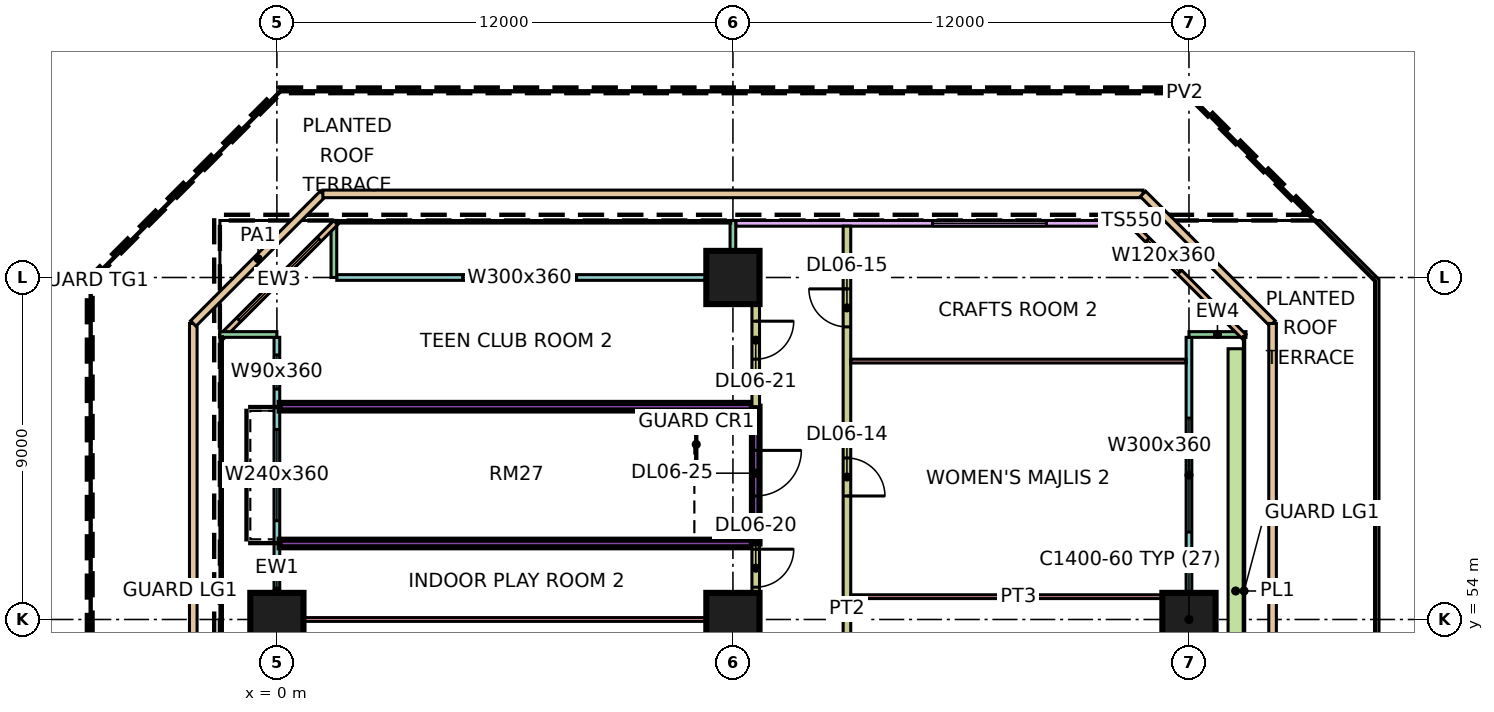
"""IFC4 building model, lengths in metres.
Left out: names, types, materials, properties, quantities, classifications, styles, units other than length and angle.
Written with IfcOpenShell. Run it as: python <this file> out.ifc"""

import sys

from ifc_helpers import new_model, si_unit, direction, frame, frame_2d, origin, origin_2d, place, context, subcontext, project, spatial, rectangle, extrude, element, fill, save


model = new_model("IFC4")
c1 = context("Model", 3, precision=1e-05, world=origin(), true_north=direction((0.0, 1.0)))
c2 = subcontext(c1, "Body", "Model", "MODEL_VIEW")
j1 = project(units=[si_unit("LENGTHUNIT", "METRE"), si_unit("PLANEANGLEUNIT", "RADIAN")], contexts=[c1])
p1 = place(None, origin())
s1 = spatial("IfcSite", under=j1, at=p1, CompositionType="ELEMENT")
p2 = place(p1, origin())
s2 = spatial("IfcBuilding", under=s1, at=p2, CompositionType="ELEMENT")
p3 = place(p2, frame((0.0, 0.0, 35.4)))
s3 = spatial("IfcBuildingStorey", under=s2, at=p3, CompositionType="ELEMENT", Elevation=35.4)
for number, where, z_axis, x_axis in (
    (1, (0.0, 54.0, 0.0), (0.0, 0.0, 1.0), (1.0, 0.0, 0.0)),
    (2, (12.0, 54.0, 0.0), (0.0, 0.0, 1.0), (1.0, 0.0, 0.0)),
):
    element("IfcColumn", number, at=place(p3, frame(where, z_axis=z_axis, x_axis=x_axis)), inside=s3, PredefinedType="COLUMN", context=c2, shape_type="SweptSolid", body=[
        extrude(rectangle(XDim=1.4, YDim=1.4, at=origin_2d()), origin(), (0.0, 0.0, 1.0), 6.0),
    ])
p4 = place(p3, frame((12.0, 63.0, 0.0), z_axis=(0.0, 0.0, 1.0), x_axis=(1.0, 0.0, 0.0)))
e3 = element("IfcColumn", 3, at=p4, inside=s3, PredefinedType="COLUMN", context=c2, shape_type="SweptSolid", body=[
    extrude(rectangle(XDim=1.4, YDim=1.4, at=origin_2d()), origin(), (0.0, 0.0, 1.0), 6.0),
])
p5 = place(p3, frame((24.0, 54.0, 0.0), z_axis=(0.0, 0.0, 1.0), x_axis=(1.0, 0.0, 0.0)))
e4 = element("IfcColumn", 4, at=p5, inside=s3, PredefinedType="COLUMN", context=c2, shape_type="SweptSolid", body=[
    extrude(rectangle(XDim=1.4, YDim=1.4, at=origin_2d()), origin(), (0.0, 0.0, 1.0), 6.0),
])
p6 = place(p3, frame((24.0, 48.075, 0.0), z_axis=(0.0, 0.0, 1.0), x_axis=(0.0, 1.0, 0.0)))
e5 = element("IfcWall", 5, at=p6, inside=s3, PredefinedType="SOLIDWALL", context=c2, shape_type="SweptSolid", body=[
    extrude(rectangle(XDim=13.35, YDim=0.15, at=frame_2d((6.675, 0.0))), origin(), (0.0, 0.0, 1.0), 5.6),
])
p7 = place(p6, frame((1.062, 0.0, 0.45)))
e6 = element("IfcOpeningElement", 6, at=p7, cuts=e5, PredefinedType="OPENING", context=c2, shape_type="SweptSolid", body=[
    extrude(rectangle(XDim=3.0, YDim=3.6, at=frame_2d((1.5, 1.8))), frame((0.0, 0.085, 0.0), z_axis=(0.0, -1.0, 0.0), x_axis=(1.0, 0.0, 0.0)), (0.0, 0.0, 1.0), 0.17),
])
p8 = place(p6, frame((8.225, 0.0, 0.45)))
e7 = element("IfcOpeningElement", 7, at=p8, cuts=e5, PredefinedType="OPENING", context=c2, shape_type="SweptSolid", body=[
    extrude(rectangle(XDim=3.0, YDim=3.6, at=frame_2d((1.5, 1.8))), frame((0.0, 0.085, 0.0), z_axis=(0.0, -1.0, 0.0), x_axis=(1.0, 0.0, 0.0)), (0.0, 0.0, 1.0), 0.17),
])
p9 = place(p3, frame((25.5, 61.5, 0.0), z_axis=(0.0, 0.0, 1.0), x_axis=(-1.0, 0.0, 0.0)))
e8 = element("IfcWall", 8, at=p9, inside=s3, PredefinedType="SOLIDWALL", context=c2, shape_type="SweptSolid", body=[
    extrude(rectangle(XDim=1.5, YDim=0.15, at=frame_2d((0.75, 0.0))), origin(), (0.0, 0.0, 1.0), 5.6),
])
p10 = place(p3, frame((25.447, 61.447, 0.0), z_axis=(0.0, 0.0, 1.0), x_axis=(-0.707106781187, 0.707106781187, 0.0)))
e9 = element("IfcWall", 9, at=p10, inside=s3, PredefinedType="SOLIDWALL", context=c2, shape_type="SweptSolid", body=[
    extrude(rectangle(XDim=4.243, YDim=0.15, at=frame_2d((2.121, 0.0))), origin(), (0.0, 0.0, 1.0), 5.6),
])
p11 = place(p10, frame((2.395, 0.0, 0.45)))
e10 = element("IfcOpeningElement", 10, at=p11, cuts=e9, PredefinedType="OPENING", context=c2, shape_type="SweptSolid", body=[
    extrude(rectangle(XDim=1.2, YDim=3.6, at=frame_2d((0.6, 1.8))), frame((0.0, 0.085, 0.0), z_axis=(0.0, -1.0, 0.0), x_axis=(1.0, 0.0, 0.0)), (0.0, 0.0, 1.0), 0.17),
])
p12 = place(p3, frame((22.5, 64.425, 0.0), z_axis=(0.0, 0.0, 1.0), x_axis=(-1.0, 0.0, 0.0)))
e11 = element("IfcWall", 11, at=p12, inside=s3, PredefinedType="SOLIDWALL", context=c2, shape_type="SweptSolid", body=[
    extrude(rectangle(XDim=10.425, YDim=0.15, at=frame_2d((5.212, 0.0))), origin(), (0.0, 0.0, 1.0), 5.6),
])
p13 = place(p12, frame((2.25, 0.0, 0.45)))
e12 = element("IfcOpeningElement", 12, at=p13, cuts=e11, PredefinedType="OPENING", context=c2, shape_type="SweptSolid", body=[
    extrude(rectangle(XDim=3.0, YDim=3.6, at=frame_2d((1.5, 1.8))), frame((0.0, 0.085, 0.0), z_axis=(0.0, -1.0, 0.0), x_axis=(1.0, 0.0, 0.0)), (0.0, 0.0, 1.0), 0.17),
])
p14 = place(p3, frame((11.925, 63.0, 0.0), z_axis=(0.0, 0.0, 1.0), x_axis=(-1.0, 0.0, 0.0)))
e13 = element("IfcWall", 13, at=p14, inside=s3, PredefinedType="SOLIDWALL", context=c2, shape_type="SweptSolid", body=[
    extrude(rectangle(XDim=10.35, YDim=0.15, at=frame_2d((5.175, 0.0))), origin(), (0.0, 0.0, 1.0), 5.6),
])
p15 = place(p14, frame((4.038, 0.0, 0.45)))
e14 = element("IfcOpeningElement", 14, at=p15, cuts=e13, PredefinedType="OPENING", context=c2, shape_type="SweptSolid", body=[
    extrude(rectangle(XDim=3.0, YDim=3.6, at=frame_2d((1.5, 1.8))), frame((0.0, 0.085, 0.0), z_axis=(0.0, -1.0, 0.0), x_axis=(1.0, 0.0, 0.0)), (0.0, 0.0, 1.0), 0.17),
])
for number, where, z_axis, x_axis in (
    (15, (12.0, 64.5, 0.0), (0.0, 0.0, 1.0), (0.0, -1.0, 0.0)),
    (16, (1.5, 64.5, 0.0), (0.0, 0.0, 1.0), (0.0, -1.0, 0.0)),
):
    element("IfcWall", number, at=place(p3, frame(where, z_axis=z_axis, x_axis=x_axis)), inside=s3, PredefinedType="SOLIDWALL", context=c2, shape_type="SweptSolid", body=[
        extrude(rectangle(XDim=1.5, YDim=0.15, at=frame_2d((0.75, 0.0))), origin(), (0.0, 0.0, 1.0), 5.6),
    ])
p16 = place(p3, frame((1.553, 64.447, 0.0), z_axis=(0.0, 0.0, 1.0), x_axis=(-0.707106781187, -0.707106781187, 0.0)))
e17 = element("IfcWall", 17, at=p16, inside=s3, PredefinedType="SOLIDWALL", context=c2, shape_type="SweptSolid", body=[
    extrude(rectangle(XDim=4.243, YDim=0.15, at=frame_2d((2.121, 0.0))), origin(), (0.0, 0.0, 1.0), 5.6),
])
p17 = place(p16, frame((0.621, 0.0, 0.45)))
e18 = element("IfcOpeningElement", 18, at=p17, cuts=e17, PredefinedType="OPENING", context=c2, shape_type="SweptSolid", body=[
    extrude(rectangle(XDim=3.0, YDim=3.6, at=frame_2d((1.5, 1.8))), frame((0.0, 0.085, 0.0), z_axis=(0.0, -1.0, 0.0), x_axis=(1.0, 0.0, 0.0)), (0.0, 0.0, 1.0), 0.17),
])
p18 = place(p3, frame((0.0, 61.425, 0.0), z_axis=(0.0, 0.0, 1.0), x_axis=(0.0, -1.0, 0.0)))
e19 = element("IfcWall", 19, at=p18, inside=s3, PredefinedType="SOLIDWALL", context=c2, shape_type="SweptSolid", body=[
    extrude(rectangle(XDim=13.35, YDim=0.15, at=frame_2d((6.675, 0.0))), origin(), (0.0, 0.0, 1.0), 5.6),
])
p19 = place(p18, frame((0.462, 0.0, 0.45)))
e20 = element("IfcOpeningElement", 20, at=p19, cuts=e19, PredefinedType="OPENING", context=c2, shape_type="SweptSolid", body=[
    extrude(rectangle(XDim=0.9, YDim=3.6, at=frame_2d((0.45, 1.8))), frame((0.0, 0.085, 0.0), z_axis=(0.0, -1.0, 0.0), x_axis=(1.0, 0.0, 0.0)), (0.0, 0.0, 1.0), 0.17),
])
p20 = place(p18, frame((2.425, 0.0, 0.45)))
e21 = element("IfcOpeningElement", 21, at=p20, cuts=e19, PredefinedType="OPENING", context=c2, shape_type="SweptSolid", body=[
    extrude(rectangle(XDim=2.4, YDim=3.6, at=frame_2d((1.2, 1.8))), frame((0.0, 0.085, 0.0), z_axis=(0.0, -1.0, 0.0), x_axis=(1.0, 0.0, 0.0)), (0.0, 0.0, 1.0), 0.17),
])
p21 = place(p18, frame((8.825, 0.0, 0.45)))
e22 = element("IfcOpeningElement", 22, at=p21, cuts=e19, PredefinedType="OPENING", context=c2, shape_type="SweptSolid", body=[
    extrude(rectangle(XDim=2.4, YDim=3.6, at=frame_2d((1.2, 1.8))), frame((0.0, 0.085, 0.0), z_axis=(0.0, -1.0, 0.0), x_axis=(1.0, 0.0, 0.0)), (0.0, 0.0, 1.0), 0.17),
])
p22 = place(p3, frame((-1.5, 61.5, 0.0), z_axis=(0.0, 0.0, 1.0), x_axis=(1.0, 0.0, 0.0)))
e23 = element("IfcWall", 23, at=p22, inside=s3, PredefinedType="SOLIDWALL", context=c2, shape_type="SweptSolid", body=[
    extrude(rectangle(XDim=1.5, YDim=0.15, at=frame_2d((0.75, 0.0))), origin(), (0.0, 0.0, 1.0), 5.6),
])
p23 = place(p3, frame((25.229, 48.375, 0.0), z_axis=(0.0, 0.0, 1.0), x_axis=(0.0, 1.0, 0.0)))
e24 = element("IfcWall", 24, at=p23, inside=s3, PredefinedType="SOLIDWALL", context=c2, shape_type="SweptSolid", body=[
    extrude(rectangle(XDim=12.75, YDim=0.4, at=frame_2d((6.375, 0.0))), origin(), (0.0, 0.0, 1.0), 0.7),
])
p24 = place(p3, frame((-2.2, 12.21, 0.0), z_axis=(0.0, 0.0, 1.0), x_axis=(0.0, 1.0, 0.0)))
e25 = element("IfcWall", 25, at=p24, inside=s3, PredefinedType="PARAPET", context=c2, shape_type="SweptSolid", body=[
    extrude(rectangle(XDim=49.58, YDim=0.2, at=frame_2d((24.79, 0.0))), origin(), (0.0, 0.0, 1.0), 0.5),
])
p25 = place(p3, frame((-2.2, 61.79, 0.0), z_axis=(0.0, 0.0, 1.0), x_axis=(0.707106781187, 0.707106781187, 0.0)))
e26 = element("IfcWall", 26, at=p25, inside=s3, PredefinedType="PARAPET", context=c2, shape_type="SweptSolid", body=[
    extrude(rectangle(XDim=4.822, YDim=0.2, at=frame_2d((2.411, 0.0))), origin(), (0.0, 0.0, 1.0), 0.5),
])
p26 = place(p3, frame((1.21, 65.2, 0.0), z_axis=(0.0, 0.0, 1.0), x_axis=(1.0, 0.0, 0.0)))
e27 = element("IfcWall", 27, at=p26, inside=s3, PredefinedType="PARAPET", context=c2, shape_type="SweptSolid", body=[
    extrude(rectangle(XDim=21.58, YDim=0.2, at=frame_2d((10.79, 0.0))), origin(), (0.0, 0.0, 1.0), 0.5),
])
p27 = place(p3, frame((22.79, 65.2, 0.0), z_axis=(0.0, 0.0, 1.0), x_axis=(0.707106781187, -0.707106781187, 0.0)))
e28 = element("IfcWall", 28, at=p27, inside=s3, PredefinedType="PARAPET", context=c2, shape_type="SweptSolid", body=[
    extrude(rectangle(XDim=4.822, YDim=0.2, at=frame_2d((2.411, 0.0))), origin(), (0.0, 0.0, 1.0), 0.5),
])
p28 = place(p3, frame((26.2, 61.79, 0.0), z_axis=(0.0, 0.0, 1.0), x_axis=(0.0, -1.0, 0.0)))
e29 = element("IfcWall", 29, at=p28, inside=s3, PredefinedType="PARAPET", context=c2, shape_type="SweptSolid", body=[
    extrude(rectangle(XDim=21.0, YDim=0.2, at=frame_2d((10.5, 0.0))), origin(), (0.0, 0.0, 1.0), 0.5),
])
p29 = place(p3, frame((0.074, 54.0, 0.0), z_axis=(0.0, 0.0, 1.0), x_axis=(1.0, 0.0, 0.0)))
e30 = element("IfcWall", 30, at=p29, inside=s3, PredefinedType="PARTITIONING", context=c2, shape_type="SweptSolid", body=[
    extrude(rectangle(XDim=12.426, YDim=0.1, at=frame_2d((6.213, 0.0))), origin(), (0.0, 0.0, 1.0), 5.6),
])
for number, where, z_axis, x_axis in (
    (31, (0.074, 56.0, 0.0), (0.0, 0.0, 1.0), (1.0, 0.0, 0.0)),
    (32, (0.074, 59.6, 0.0), (0.0, 0.0, 1.0), (1.0, 0.0, 0.0)),
):
    element("IfcWall", number, at=place(p3, frame(where, z_axis=z_axis, x_axis=x_axis)), inside=s3, PredefinedType="SOLIDWALL", context=c2, shape_type="SweptSolid", body=[
        extrude(rectangle(XDim=12.426, YDim=0.2, at=frame_2d((6.213, 0.0))), origin(), (0.0, 0.0, 1.0), 5.6),
    ])
e33 = element("IfcWall", 33, at=p4, inside=s3, PredefinedType="PARTITIONING", context=c2, shape_type="SweptSolid", body=[
    extrude(rectangle(XDim=0.5, YDim=0.2, at=frame_2d((0.25, 0.0))), origin(), (0.0, 0.0, 1.0), 5.6),
])
p30 = place(p3, frame((12.6, 49.6, 0.0), z_axis=(0.0, 0.0, 1.0), x_axis=(0.0, 1.0, 0.0)))
e34 = element("IfcWall", 34, at=p30, inside=s3, PredefinedType="PARTITIONING", context=c2, shape_type="SweptSolid", body=[
    extrude(rectangle(XDim=6.4, YDim=0.2, at=frame_2d((3.2, 0.0))), origin(), (0.0, 0.0, 1.0), 5.6),
])
p31 = place(p30, frame((1.75, 0.0, 0.0)))
e35 = element("IfcOpeningElement", 35, at=p31, cuts=e34, PredefinedType="OPENING", context=c2, shape_type="SweptSolid", body=[
    extrude(rectangle(XDim=1.0, YDim=2.1, at=frame_2d((0.5, 1.05))), frame((0.0, 0.11, 0.0), z_axis=(0.0, -1.0, 0.0), x_axis=(1.0, 0.0, 0.0)), (0.0, 0.0, 1.0), 0.22),
])
p32 = place(p30, frame((5.25, 0.0, 0.0)))
e36 = element("IfcOpeningElement", 36, at=p32, cuts=e34, PredefinedType="OPENING", context=c2, shape_type="SweptSolid", body=[
    extrude(rectangle(XDim=1.0, YDim=2.1, at=frame_2d((0.5, 1.05))), frame((0.0, 0.11, 0.0), z_axis=(0.0, -1.0, 0.0), x_axis=(1.0, 0.0, 0.0)), (0.0, 0.0, 1.0), 0.22),
])
p33 = place(p3, frame((12.6, 56.0, 0.0), z_axis=(0.0, 0.0, 1.0), x_axis=(0.0, 1.0, 0.0)))
e37 = element("IfcWall", 37, at=p33, inside=s3, PredefinedType="SOLIDWALL", context=c2, shape_type="SweptSolid", body=[
    extrude(rectangle(XDim=3.6, YDim=0.2, at=frame_2d((1.8, 0.0))), origin(), (0.0, 0.0, 1.0), 5.6),
])
p34 = place(p33, frame((1.25, 0.0, 0.0)))
e38 = element("IfcOpeningElement", 38, at=p34, cuts=e37, PredefinedType="OPENING", context=c2, shape_type="SweptSolid", body=[
    extrude(rectangle(XDim=1.2, YDim=2.1, at=frame_2d((0.6, 1.05))), frame((0.0, 0.11, 0.0), z_axis=(0.0, -1.0, 0.0), x_axis=(1.0, 0.0, 0.0)), (0.0, 0.0, 1.0), 0.22),
])
p35 = place(p3, frame((12.6, 59.6, 0.0), z_axis=(0.0, 0.0, 1.0), x_axis=(0.0, 1.0, 0.0)))
e39 = element("IfcWall", 39, at=p35, inside=s3, PredefinedType="PARTITIONING", context=c2, shape_type="SweptSolid", body=[
    extrude(rectangle(XDim=3.5, YDim=0.2, at=frame_2d((1.75, 0.0))), origin(), (0.0, 0.0, 1.0), 5.6),
])
p36 = place(p35, frame((1.25, 0.0, 0.0)))
e40 = element("IfcOpeningElement", 40, at=p36, cuts=e39, PredefinedType="OPENING", context=c2, shape_type="SweptSolid", body=[
    extrude(rectangle(XDim=1.0, YDim=2.1, at=frame_2d((0.5, 1.05))), frame((0.0, 0.11, 0.0), z_axis=(0.0, -1.0, 0.0), x_axis=(1.0, 0.0, 0.0)), (0.0, 0.0, 1.0), 0.22),
])
p37 = place(p3, frame((15.0, 44.2, 0.0), z_axis=(0.0, 0.0, 1.0), x_axis=(0.0, 1.0, 0.0)))
e41 = element("IfcWall", 41, at=p37, inside=s3, PredefinedType="PARTITIONING", context=c2, shape_type="SweptSolid", body=[
    extrude(rectangle(XDim=20.151, YDim=0.2, at=frame_2d((10.076, 0.0))), origin(), (0.0, 0.0, 1.0), 5.6),
])
p38 = place(p37, frame((1.4, 0.0, 0.0)))
e42 = element("IfcOpeningElement", 42, at=p38, cuts=e41, PredefinedType="OPENING", context=c2, shape_type="SweptSolid", body=[
    extrude(rectangle(XDim=1.0, YDim=2.1, at=frame_2d((0.5, 1.05))), frame((0.0, 0.11, 0.0), z_axis=(0.0, -1.0, 0.0), x_axis=(1.0, 0.0, 0.0)), (0.0, 0.0, 1.0), 0.22),
])
p39 = place(p37, frame((6.475, 0.0, 0.0)))
e43 = element("IfcOpeningElement", 43, at=p39, cuts=e41, PredefinedType="OPENING", context=c2, shape_type="SweptSolid", body=[
    extrude(rectangle(XDim=1.0, YDim=2.1, at=frame_2d((0.5, 1.05))), frame((0.0, 0.11, 0.0), z_axis=(0.0, -1.0, 0.0), x_axis=(1.0, 0.0, 0.0)), (0.0, 0.0, 1.0), 0.22),
])
p40 = place(p37, frame((13.05, 0.0, 0.0)))
e44 = element("IfcOpeningElement", 44, at=p40, cuts=e41, PredefinedType="OPENING", context=c2, shape_type="SweptSolid", body=[
    extrude(rectangle(XDim=1.0, YDim=2.1, at=frame_2d((0.5, 1.05))), frame((0.0, 0.11, 0.0), z_axis=(0.0, -1.0, 0.0), x_axis=(1.0, 0.0, 0.0)), (0.0, 0.0, 1.0), 0.22),
])
p41 = place(p37, frame((17.5, 0.0, 0.0)))
e45 = element("IfcOpeningElement", 45, at=p41, cuts=e41, PredefinedType="OPENING", context=c2, shape_type="SweptSolid", body=[
    extrude(rectangle(XDim=1.0, YDim=2.1, at=frame_2d((0.5, 1.05))), frame((0.0, 0.11, 0.0), z_axis=(0.0, -1.0, 0.0), x_axis=(1.0, 0.0, 0.0)), (0.0, 0.0, 1.0), 0.22),
])
for number, where, z_axis, x_axis in (
    (46, (15.1, 54.6, 0.0), (0.0, 0.0, 1.0), (1.0, 0.0, 0.0)),
    (47, (15.1, 60.8, 0.0), (0.0, 0.0, 1.0), (1.0, 0.0, 0.0)),
):
    element("IfcWall", number, at=place(p3, frame(where, z_axis=z_axis, x_axis=x_axis)), inside=s3, PredefinedType="PARTITIONING", context=c2, shape_type="SweptSolid", body=[
        extrude(rectangle(XDim=8.826, YDim=0.1, at=frame_2d((4.413, 0.0))), origin(), (0.0, 0.0, 1.0), 5.6),
    ])
p42 = place(p8, origin())
e48 = element("IfcWindow", 48, at=p42, inside=s3, PartitioningType="SINGLE_PANEL", PredefinedType="WINDOW", context=c2, shape_type="SweptSolid", body=[
    extrude(rectangle(XDim=3.0, YDim=3.6, at=frame_2d((1.5, 1.8))), frame((0.0, 0.03, 0.0), z_axis=(0.0, -1.0, 0.0), x_axis=(1.0, 0.0, 0.0)), (0.0, 0.0, 1.0), 0.06),
])
fill(e7, e48)
p43 = place(p11, origin())
e49 = element("IfcWindow", 49, at=p43, inside=s3, PartitioningType="SINGLE_PANEL", PredefinedType="WINDOW", context=c2, shape_type="SweptSolid", body=[
    extrude(rectangle(XDim=1.2, YDim=3.6, at=frame_2d((0.6, 1.8))), frame((0.0, 0.03, 0.0), z_axis=(0.0, -1.0, 0.0), x_axis=(1.0, 0.0, 0.0)), (0.0, 0.0, 1.0), 0.06),
])
fill(e10, e49)
p44 = place(p13, origin())
e50 = element("IfcWindow", 50, at=p44, inside=s3, PartitioningType="SINGLE_PANEL", PredefinedType="WINDOW", context=c2, shape_type="SweptSolid", body=[
    extrude(rectangle(XDim=3.0, YDim=3.6, at=frame_2d((1.5, 1.8))), frame((0.0, 0.03, 0.0), z_axis=(0.0, -1.0, 0.0), x_axis=(1.0, 0.0, 0.0)), (0.0, 0.0, 1.0), 0.06),
])
fill(e12, e50)
p45 = place(p15, origin())
e51 = element("IfcWindow", 51, at=p45, inside=s3, PartitioningType="SINGLE_PANEL", PredefinedType="WINDOW", context=c2, shape_type="SweptSolid", body=[
    extrude(rectangle(XDim=3.0, YDim=3.6, at=frame_2d((1.5, 1.8))), frame((0.0, 0.03, 0.0), z_axis=(0.0, -1.0, 0.0), x_axis=(1.0, 0.0, 0.0)), (0.0, 0.0, 1.0), 0.06),
])
fill(e14, e51)
p46 = place(p17, origin())
e52 = element("IfcWindow", 52, at=p46, inside=s3, PartitioningType="SINGLE_PANEL", PredefinedType="WINDOW", context=c2, shape_type="SweptSolid", body=[
    extrude(rectangle(XDim=3.0, YDim=3.6, at=frame_2d((1.5, 1.8))), frame((0.0, 0.03, 0.0), z_axis=(0.0, -1.0, 0.0), x_axis=(1.0, 0.0, 0.0)), (0.0, 0.0, 1.0), 0.06),
])
fill(e18, e52)
p47 = place(p19, origin())
e53 = element("IfcWindow", 53, at=p47, inside=s3, PartitioningType="SINGLE_PANEL", PredefinedType="WINDOW", context=c2, shape_type="SweptSolid", body=[
    extrude(rectangle(XDim=0.9, YDim=3.6, at=frame_2d((0.45, 1.8))), frame((0.0, 0.03, 0.0), z_axis=(0.0, -1.0, 0.0), x_axis=(1.0, 0.0, 0.0)), (0.0, 0.0, 1.0), 0.06),
])
fill(e20, e53)
p48 = place(p20, origin())
e54 = element("IfcWindow", 54, at=p48, inside=s3, PartitioningType="SINGLE_PANEL", PredefinedType="WINDOW", context=c2, shape_type="SweptSolid", body=[
    extrude(rectangle(XDim=2.4, YDim=3.6, at=frame_2d((1.2, 1.8))), frame((0.0, 0.03, 0.0), z_axis=(0.0, -1.0, 0.0), x_axis=(1.0, 0.0, 0.0)), (0.0, 0.0, 1.0), 0.06),
])
fill(e21, e54)
p49 = place(p40, frame((1.0, 0.0, 0.0), z_axis=(0.0, 0.0, 1.0), x_axis=(-1.0, 0.0, 0.0)))
e55 = element("IfcDoor", 55, at=p49, inside=s3, OperationType="SINGLE_SWING_LEFT", PredefinedType="DOOR", context=c2, shape_type="SweptSolid", body=[
    extrude(rectangle(XDim=1.0, YDim=2.1, at=frame_2d((0.5, 1.05))), frame((0.0, 0.025, 0.0), z_axis=(0.0, -1.0, 0.0), x_axis=(1.0, 0.0, 0.0)), (0.0, 0.0, 1.0), 0.05),
])
fill(e44, e55)
p50 = place(p41, frame((1.0, 0.0, 0.0), z_axis=(0.0, 0.0, 1.0), x_axis=(-1.0, 0.0, 0.0)))
e56 = element("IfcDoor", 56, at=p50, inside=s3, OperationType="SINGLE_SWING_RIGHT", PredefinedType="DOOR", context=c2, shape_type="SweptSolid", body=[
    extrude(rectangle(XDim=1.0, YDim=2.1, at=frame_2d((0.5, 1.05))), frame((0.0, 0.025, 0.0), z_axis=(0.0, -1.0, 0.0), x_axis=(1.0, 0.0, 0.0)), (0.0, 0.0, 1.0), 0.05),
])
fill(e45, e56)
p51 = place(p32, origin())
e57 = element("IfcDoor", 57, at=p51, inside=s3, OperationType="SINGLE_SWING_RIGHT", PredefinedType="DOOR", context=c2, shape_type="SweptSolid", body=[
    extrude(rectangle(XDim=1.0, YDim=2.1, at=frame_2d((0.5, 1.05))), frame((0.0, 0.025, 0.0), z_axis=(0.0, -1.0, 0.0), x_axis=(1.0, 0.0, 0.0)), (0.0, 0.0, 1.0), 0.05),
])
fill(e36, e57)
p52 = place(p36, origin())
e58 = element("IfcDoor", 58, at=p52, inside=s3, OperationType="SINGLE_SWING_RIGHT", PredefinedType="DOOR", context=c2, shape_type="SweptSolid", body=[
    extrude(rectangle(XDim=1.0, YDim=2.1, at=frame_2d((0.5, 1.05))), frame((0.0, 0.025, 0.0), z_axis=(0.0, -1.0, 0.0), x_axis=(1.0, 0.0, 0.0)), (0.0, 0.0, 1.0), 0.05),
])
fill(e40, e58)
p53 = place(p34, origin())
e59 = element("IfcDoor", 59, at=p53, inside=s3, OperationType="SINGLE_SWING_RIGHT", PredefinedType="DOOR", context=c2, shape_type="SweptSolid", body=[
    extrude(rectangle(XDim=1.2, YDim=2.1, at=frame_2d((0.6, 1.05))), frame((0.0, 0.025, 0.0), z_axis=(0.0, -1.0, 0.0), x_axis=(1.0, 0.0, 0.0)), (0.0, 0.0, 1.0), 0.05),
])
fill(e38, e59)
save(model, sys.argv[1])
